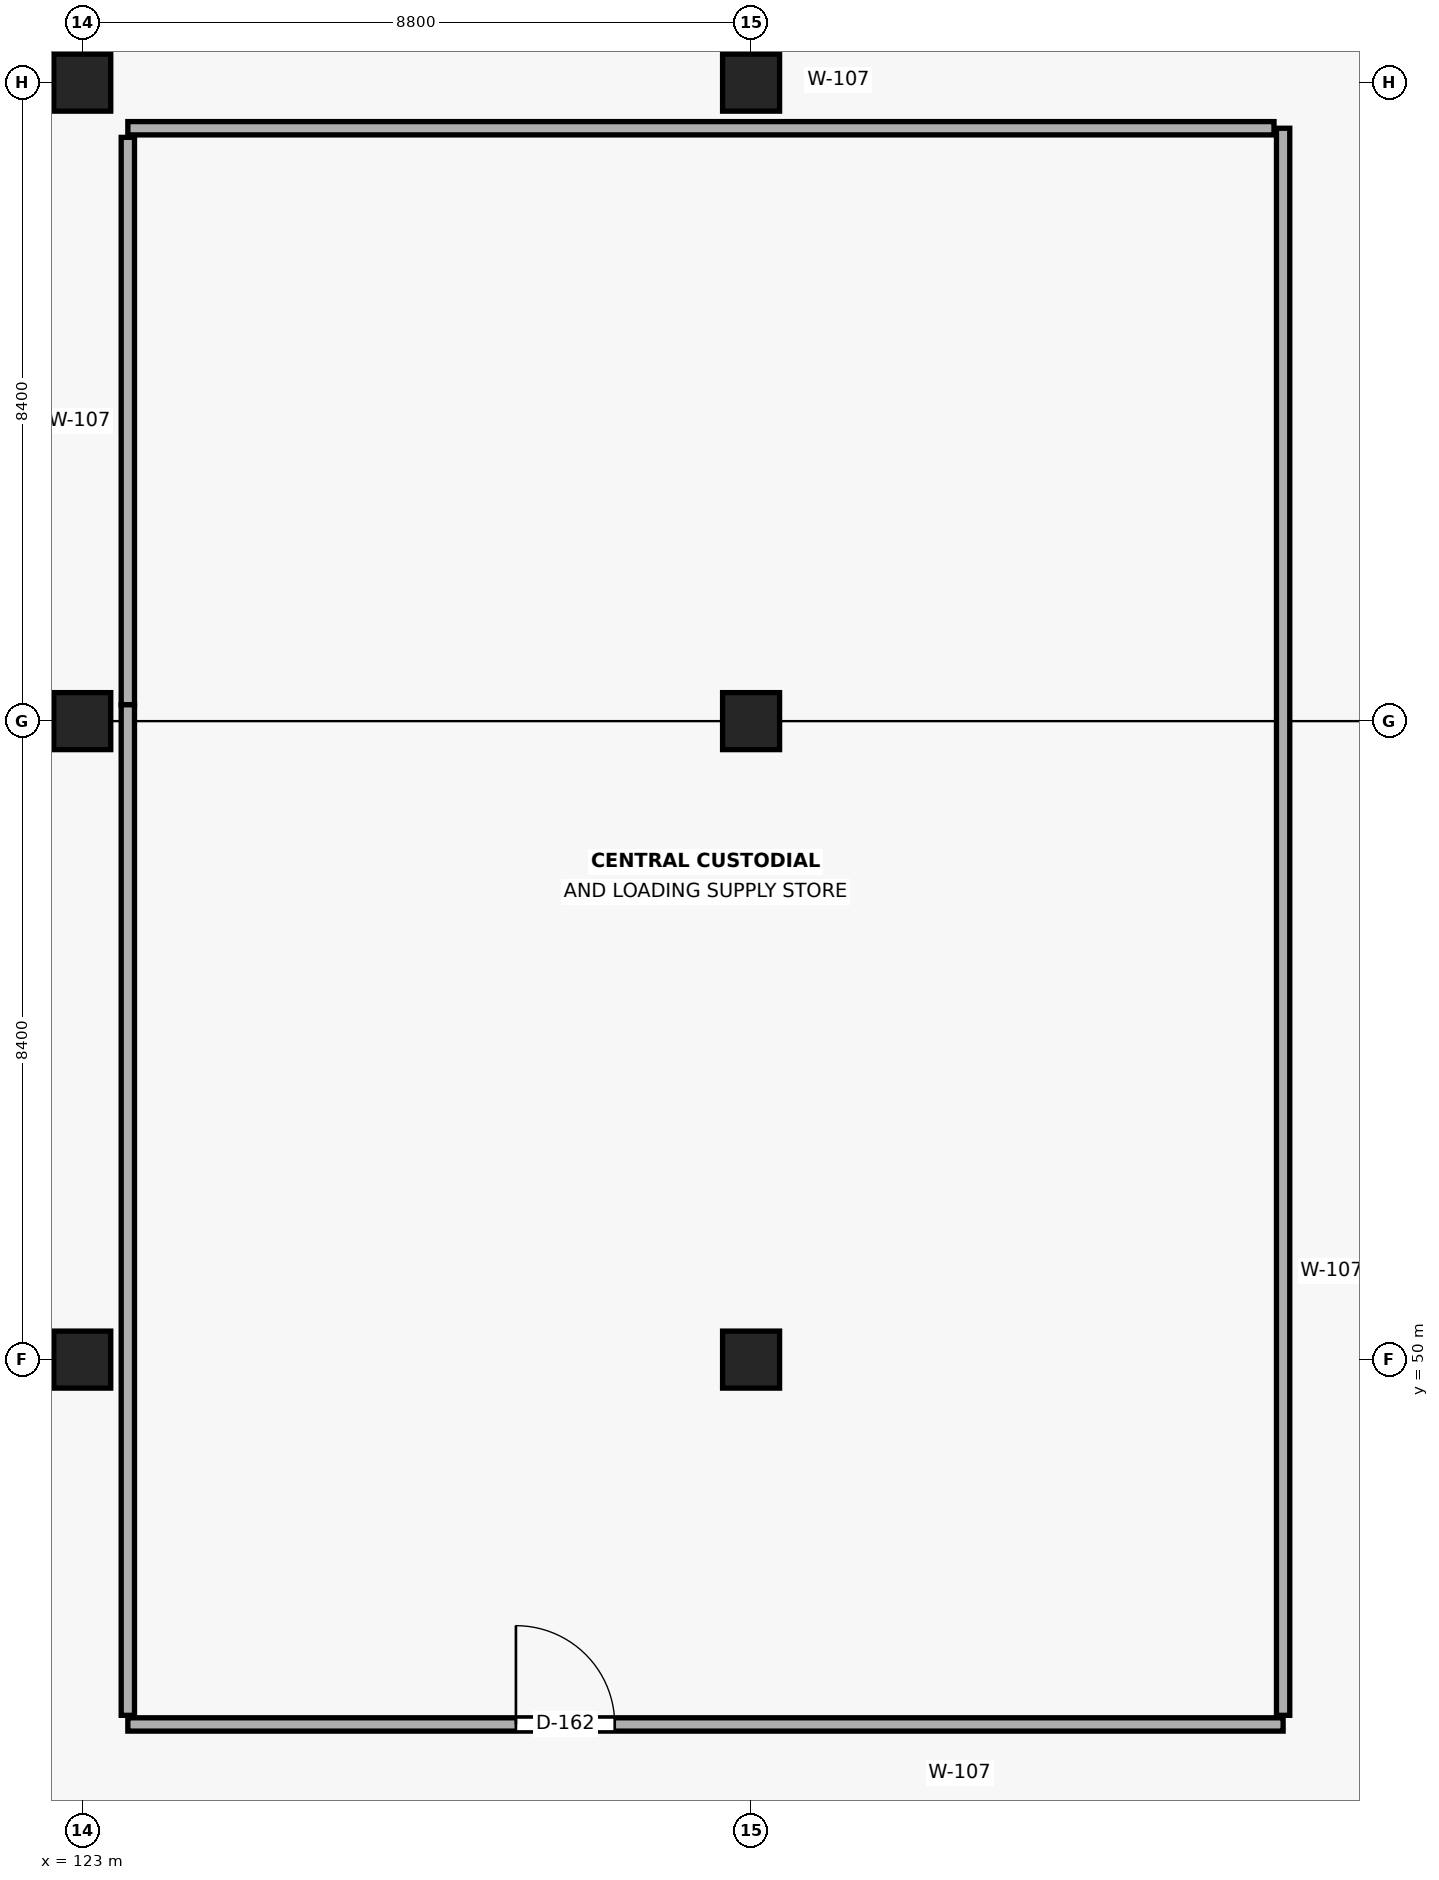
"""IFC4 building model, lengths in metres.
Left out: names, types, materials, properties, quantities, classifications, styles, units other than length and angle.
Written with IfcOpenShell. Run it as: python <this file> out.ifc"""

import sys

from ifc_helpers import new_model, si_unit, direction, frame, frame_2d, origin, origin_2d, place, context, subcontext, project, spatial, rectangle, extrude, element, fill, save


model = new_model("IFC4")
c1 = context("Model", 3, precision=1e-05, world=origin(), true_north=direction((0.0, 1.0)))
c2 = subcontext(c1, "Body", "Model", "MODEL_VIEW")
j1 = project(units=[si_unit("LENGTHUNIT", "METRE"), si_unit("PLANEANGLEUNIT", "RADIAN")], contexts=[c1])
p1 = place(None, origin())
s1 = spatial("IfcSite", under=j1, at=p1, CompositionType="ELEMENT")
p2 = place(p1, origin())
s2 = spatial("IfcBuilding", under=s1, at=p2, CompositionType="ELEMENT")
p3 = place(p2, frame((0.0, 0.0, -4.5)))
s3 = spatial("IfcBuildingStorey", under=s2, at=p3, CompositionType="ELEMENT", Elevation=-4.5)
for number, where, z_axis, x_axis in (
    (1, (123.0, 50.0, 0.0), (0.0, 0.0, 1.0), (1.0, 0.0, 0.0)),
    (2, (123.0, 58.4, 0.0), (0.0, 0.0, 1.0), (1.0, 0.0, 0.0)),
    (3, (123.0, 66.8, 0.0), (0.0, 0.0, 1.0), (1.0, 0.0, 0.0)),
    (4, (131.8, 50.0, 0.0), (0.0, 0.0, 1.0), (1.0, 0.0, 0.0)),
    (5, (131.8, 58.4, 0.0), (0.0, 0.0, 1.0), (1.0, 0.0, 0.0)),
    (6, (131.8, 66.8, 0.0), (0.0, 0.0, 1.0), (1.0, 0.0, 0.0)),
):
    element("IfcColumn", number, at=place(p3, frame(where, z_axis=z_axis, x_axis=x_axis)), inside=s3, PredefinedType="COLUMN", context=c2, shape_type="SweptSolid", body=[
        extrude(rectangle(XDim=0.75, YDim=0.75, at=origin_2d()), origin(), (0.0, 0.0, 1.0), 4.5),
    ])
p4 = place(p3, frame((123.6, 45.2, 0.0), z_axis=(0.0, 0.0, 1.0), x_axis=(1.0, 0.0, 0.0)))
e7 = element("IfcWall", 7, at=p4, inside=s3, PredefinedType="PARTITIONING", context=c2, shape_type="SweptSolid", body=[
    extrude(rectangle(XDim=15.2, YDim=0.175, at=frame_2d((7.6, 0.0))), origin(), (0.0, 0.0, 1.0), 4.14),
])
p5 = place(p4, frame((5.106, 0.0, 0.0)))
e8 = element("IfcOpeningElement", 8, at=p5, cuts=e7, PredefinedType="OPENING", context=c2, shape_type="SweptSolid", body=[
    extrude(rectangle(XDim=1.3, YDim=2.25, at=frame_2d((0.65, 1.125))), frame((0.0, 0.1, 0.0), z_axis=(0.0, -1.0, 0.0), x_axis=(1.0, 0.0, 0.0)), (0.0, 0.0, 1.0), 0.199),
])
p6 = place(p3, frame((138.8, 45.32, 0.0), z_axis=(0.0, 0.0, 1.0), x_axis=(0.0, 1.0, 0.0)))
e9 = element("IfcWall", 9, at=p6, inside=s3, PredefinedType="PARTITIONING", context=c2, shape_type="SweptSolid", body=[
    extrude(rectangle(XDim=20.88, YDim=0.175, at=frame_2d((10.44, 0.0))), origin(), (0.0, 0.0, 1.0), 4.14),
])
p7 = place(p3, frame((138.68, 66.2, 0.0), z_axis=(0.0, 0.0, 1.0), x_axis=(-1.0, 0.0, 0.0)))
e10 = element("IfcWall", 10, at=p7, inside=s3, PredefinedType="PARTITIONING", context=c2, shape_type="SweptSolid", body=[
    extrude(rectangle(XDim=15.08, YDim=0.175, at=frame_2d((7.54, 0.0))), origin(), (0.0, 0.0, 1.0), 4.14),
])
p8 = place(p3, frame((123.6, 66.08, 0.0), z_axis=(0.0, 0.0, 1.0), x_axis=(0.0, -1.0, 0.0)))
e11 = element("IfcWall", 11, at=p8, inside=s3, PredefinedType="PARTITIONING", context=c2, shape_type="SweptSolid", body=[
    extrude(rectangle(XDim=7.465, YDim=0.175, at=frame_2d((3.732, 0.0))), origin(), (0.0, 0.0, 1.0), 3.44),
])
p9 = place(p3, frame((123.6, 58.615, 0.0), z_axis=(0.0, 0.0, 1.0), x_axis=(0.0, -1.0, 0.0)))
e12 = element("IfcWall", 12, at=p9, inside=s3, PredefinedType="PARTITIONING", context=c2, shape_type="SweptSolid", body=[
    extrude(rectangle(XDim=13.295, YDim=0.175, at=frame_2d((6.647, 0.0))), origin(), (0.0, 0.0, 1.0), 4.14),
])
p10 = place(p5, origin())
e13 = element("IfcDoor", 13, at=p10, inside=s3, OperationType="SINGLE_SWING_LEFT", PredefinedType="DOOR", context=c2, shape_type="SweptSolid", body=[
    extrude(rectangle(XDim=1.3, YDim=2.25, at=frame_2d((0.65, 1.125))), frame((0.0, 0.025, 0.0), z_axis=(0.0, -1.0, 0.0), x_axis=(1.0, 0.0, 0.0)), (0.0, 0.0, 1.0), 0.05),
])
fill(e8, e13)
save(model, sys.argv[1])
